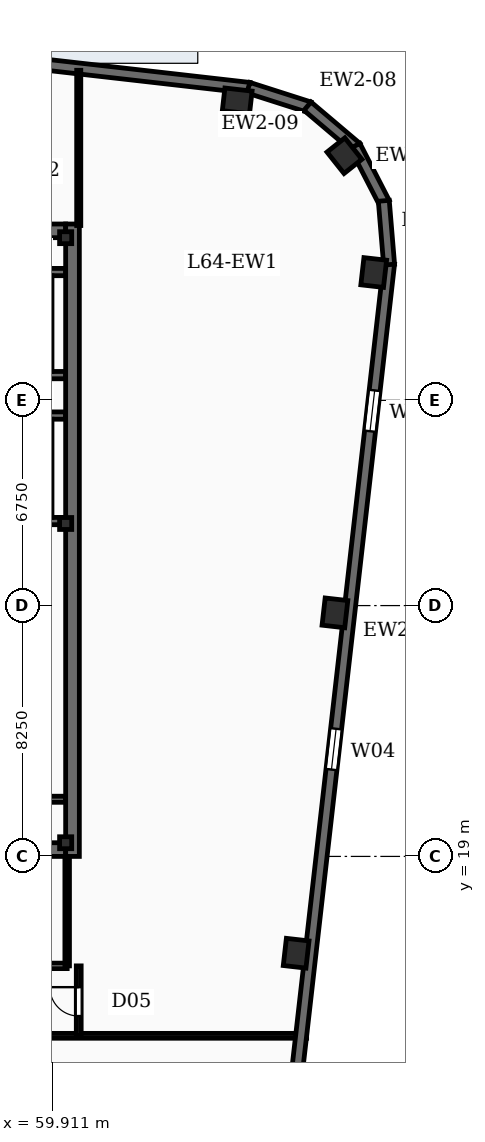
"""IFC4 building model, lengths in metres.
Left out: names, types, materials, properties, quantities, classifications, styles, units other than length and angle.
Written with IfcOpenShell. Run it as: python <this file> out.ifc"""

import sys

from ifc_helpers import new_model, si_unit, direction, frame, frame_2d, origin, origin_2d, place, context, subcontext, project, spatial, rectangle, i_section, extrude, element, fill, save


model = new_model("IFC4")
c1 = context("Model", 3, precision=1e-05, world=origin(), true_north=direction((0.0, 1.0)))
c2 = subcontext(c1, "Body", "Model", "MODEL_VIEW")
j1 = project(units=[si_unit("LENGTHUNIT", "METRE"), si_unit("PLANEANGLEUNIT", "RADIAN")], contexts=[c1])
p1 = place(None, origin())
s1 = spatial("IfcSite", under=j1, at=p1, CompositionType="ELEMENT")
p2 = place(p1, origin())
s2 = spatial("IfcBuilding", under=s1, at=p2, CompositionType="ELEMENT")
p3 = place(p2, frame((0.0, 0.0, 262.2)))
s3 = spatial("IfcBuildingStorey", under=s2, at=p3, CompositionType="ELEMENT", Elevation=262.2)
p4 = place(p3, frame((60.575, 19.0, -0.27), z_axis=(0.0, 0.0, 1.0), x_axis=(0.0, 1.0, 0.0)))
e1 = element("IfcWall", 1, at=p4, inside=s3, PredefinedType="SHEAR", context=c2, shape_type="SweptSolid", body=[
    extrude(rectangle(XDim=20.8, YDim=0.45, at=frame_2d((10.4, 0.0))), origin(), (0.0, 0.0, 1.0), 3.75),
])
for number, where, z_axis, x_axis in (
    (2, (50.55, 19.225, -0.27), (0.0, 0.0, 1.0), (1.0, 0.0, 0.0)),
    (3, (50.55, 39.575, -0.27), (0.0, 0.0, 1.0), (1.0, 0.0, 0.0)),
):
    element("IfcWall", number, at=place(p3, frame(where, z_axis=z_axis, x_axis=x_axis)), inside=s3, PredefinedType="SHEAR", context=c2, shape_type="SweptSolid", body=[
        extrude(rectangle(XDim=9.8, YDim=0.45, at=frame_2d((4.9, 0.0))), origin(), (0.0, 0.0, 1.0), 3.75),
    ])
for number, where, z_axis, x_axis in (
    (4, (60.35, 19.45, -0.27), (0.0, 0.0, 1.0), (1.0, 0.0, 0.0)),
    (5, (60.35, 29.95, -0.27), (0.0, 0.0, 1.0), (1.0, 0.0, 0.0)),
    (6, (60.35, 39.35, -0.27), (0.0, 0.0, 1.0), (1.0, 0.0, 0.0)),
):
    element("IfcColumn", number, at=place(p3, frame(where, z_axis=z_axis, x_axis=x_axis)), inside=s3, PredefinedType="COLUMN", context=c2, shape_type="SweptSolid", body=[
        extrude(i_section(OverallWidth=0.399, OverallDepth=0.393, WebThickness=0.023, FlangeThickness=0.037, FilletRadius=0.02, at=origin_2d()), origin(), (0.0, 0.0, 1.0), 3.75),
    ])
for number, where, z_axis, x_axis in (
    (7, (67.931, 15.816, -0.27), (0.0, 0.0, 1.0), (0.113, 0.994, 0.0)),
    (8, (69.207, 27.01, -0.27), (0.0, 0.0, 1.0), (0.113, 0.994, 0.0)),
    (9, (70.482, 38.205, -0.27), (0.0, 0.0, 1.0), (0.113, 0.994, 0.0)),
    (10, (69.52, 42.047, -0.27), (0.0, 0.0, 1.0), (-0.623, 0.783, 0.0)),
    (11, (65.992, 43.849, -0.27), (0.0, 0.0, 1.0), (0.994, -0.113, 0.0)),
):
    element("IfcColumn", number, at=place(p3, frame(where, z_axis=z_axis, x_axis=x_axis)), inside=s3, PredefinedType="COLUMN", context=c2, shape_type="SweptSolid", body=[
        extrude(rectangle(XDim=0.9, YDim=0.75, at=origin_2d()), origin(), (0.0, 0.0, 1.0), 3.75),
    ])
p5 = place(p3, frame((70.989, 38.499, 0.0), z_axis=(0.0, 0.0, 1.0), x_axis=(-0.113203107947, -0.993571867733, 0.0)))
e12 = element("IfcWall", 12, at=p5, inside=s3, PredefinedType="SOLIDWALL", context=c2, shape_type="SweptSolid", body=[
    extrude(rectangle(XDim=34.5, YDim=0.36, at=frame_2d((17.25, 0.0))), origin(), (0.0, 0.0, 1.0), 3.48),
])
p6 = place(p5, frame((4.2, 0.0, 0.88)))
e13 = element("IfcOpeningElement", 13, at=p6, cuts=e12, PredefinedType="OPENING", context=c2, shape_type="SweptSolid", body=[
    extrude(rectangle(XDim=1.35, YDim=2.2, at=frame_2d((0.675, 1.1))), frame((0.0, 0.19, 0.0), z_axis=(0.0, -1.0, 0.0), x_axis=(1.0, 0.0, 0.0)), (0.0, 0.0, 1.0), 0.38),
])
p7 = place(p5, frame((15.4, 0.0, 0.88)))
e14 = element("IfcOpeningElement", 14, at=p7, cuts=e12, PredefinedType="OPENING", context=c2, shape_type="SweptSolid", body=[
    extrude(rectangle(XDim=1.35, YDim=2.2, at=frame_2d((0.675, 1.1))), frame((0.0, 0.19, 0.0), z_axis=(0.0, -1.0, 0.0), x_axis=(1.0, 0.0, 0.0)), (0.0, 0.0, 1.0), 0.38),
])
p8 = place(p5, frame((26.6, 0.0, 0.88)))
e15 = element("IfcOpeningElement", 15, at=p8, cuts=e12, PredefinedType="OPENING", context=c2, shape_type="SweptSolid", body=[
    extrude(rectangle(XDim=1.35, YDim=2.2, at=frame_2d((0.675, 1.1))), frame((0.0, 0.19, 0.0), z_axis=(0.0, -1.0, 0.0), x_axis=(1.0, 0.0, 0.0)), (0.0, 0.0, 1.0), 0.38),
])
p9 = place(p3, frame((70.814, 40.564, 0.0), z_axis=(0.0, 0.0, 1.0), x_axis=(0.082853678144, -0.996561723135, 0.0)))
e16 = element("IfcWall", 16, at=p9, inside=s3, PredefinedType="SOLIDWALL", context=c2, shape_type="SweptSolid", body=[
    extrude(rectangle(XDim=2.107, YDim=0.36, at=frame_2d((1.053, 0.0))), origin(), (0.0, 0.0, 1.0), 3.48),
])
for number, where, z_axis, x_axis in (
    (17, (69.868, 42.369, 0.0), (0.0, 0.0, 1.0), (0.458, -0.889, 0.0)),
    (18, (68.304, 43.676, 0.0), (0.0, 0.0, 1.0), (0.763, -0.646, 0.0)),
    (19, (66.359, 44.284, 0.0), (0.0, 0.0, 1.0), (0.952, -0.305, 0.0)),
):
    element("IfcWall", number, at=place(p3, frame(where, z_axis=z_axis, x_axis=x_axis)), inside=s3, PredefinedType="SOLIDWALL", context=c2, shape_type="SweptSolid", body=[
        extrude(rectangle(XDim=2.107, YDim=0.36, at=frame_2d((1.054, 0.0))), origin(), (0.0, 0.0, 1.0), 3.48),
    ])
p10 = place(p3, frame((19.894, 49.575, 0.0), z_axis=(0.0, 0.0, 1.0), x_axis=(0.993571439016, -0.113206870688, 0.0)))
e20 = element("IfcWall", 20, at=p10, inside=s3, PredefinedType="SOLIDWALL", context=c2, shape_type="SweptSolid", body=[
    extrude(rectangle(XDim=46.8, YDim=0.36, at=frame_2d((23.4, 0.0))), origin(), (0.0, 0.0, 1.0), 3.48),
])
p11 = place(p10, frame((2.6, 0.0, 0.88)))
e21 = element("IfcOpeningElement", 21, at=p11, cuts=e20, PredefinedType="OPENING", context=c2, shape_type="SweptSolid", body=[
    extrude(rectangle(XDim=1.8, YDim=2.15, at=frame_2d((0.9, 1.075))), frame((0.0, 0.19, 0.0), z_axis=(0.0, -1.0, 0.0), x_axis=(1.0, 0.0, 0.0)), (0.0, 0.0, 1.0), 0.38),
])
p12 = place(p10, frame((8.0, 0.0, 0.88)))
e22 = element("IfcOpeningElement", 22, at=p12, cuts=e20, PredefinedType="OPENING", context=c2, shape_type="SweptSolid", body=[
    extrude(rectangle(XDim=1.8, YDim=2.15, at=frame_2d((0.9, 1.075))), frame((0.0, 0.19, 0.0), z_axis=(0.0, -1.0, 0.0), x_axis=(1.0, 0.0, 0.0)), (0.0, 0.0, 1.0), 0.38),
])
p13 = place(p10, frame((13.4, 0.0, 0.88)))
e23 = element("IfcOpeningElement", 23, at=p13, cuts=e20, PredefinedType="OPENING", context=c2, shape_type="SweptSolid", body=[
    extrude(rectangle(XDim=1.8, YDim=2.15, at=frame_2d((0.9, 1.075))), frame((0.0, 0.19, 0.0), z_axis=(0.0, -1.0, 0.0), x_axis=(1.0, 0.0, 0.0)), (0.0, 0.0, 1.0), 0.38),
])
p14 = place(p10, frame((18.8, 0.0, 0.88)))
e24 = element("IfcOpeningElement", 24, at=p14, cuts=e20, PredefinedType="OPENING", context=c2, shape_type="SweptSolid", body=[
    extrude(rectangle(XDim=1.8, YDim=2.15, at=frame_2d((0.9, 1.075))), frame((0.0, 0.19, 0.0), z_axis=(0.0, -1.0, 0.0), x_axis=(1.0, 0.0, 0.0)), (0.0, 0.0, 1.0), 0.38),
])
p15 = place(p10, frame((29.6, 0.0, 0.88)))
e25 = element("IfcOpeningElement", 25, at=p15, cuts=e20, PredefinedType="OPENING", context=c2, shape_type="SweptSolid", body=[
    extrude(rectangle(XDim=1.8, YDim=2.15, at=frame_2d((0.9, 1.075))), frame((0.0, 0.19, 0.0), z_axis=(0.0, -1.0, 0.0), x_axis=(1.0, 0.0, 0.0)), (0.0, 0.0, 1.0), 0.38),
])
p16 = place(p3, frame((60.35, 30.03, 0.0), z_axis=(0.0, 0.0, 1.0), x_axis=(-1.0, 0.0, 0.0)))
e26 = element("IfcWall", 26, at=p16, inside=s3, PredefinedType="SOLIDWALL", context=c2, shape_type="SweptSolid", body=[
    extrude(rectangle(XDim=9.8, YDim=0.24, at=frame_2d((4.9, 0.0))), origin(), (0.0, 0.0, 1.0), 3.48),
])
p17 = place(p16, frame((7.83, 0.0, 0.0)))
e27 = element("IfcOpeningElement", 27, at=p17, cuts=e26, PredefinedType="OPENING", context=c2, shape_type="SweptSolid", body=[
    extrude(rectangle(XDim=1.1, YDim=2.15, at=frame_2d((0.55, 1.075))), frame((0.0, 0.13, 0.0), z_axis=(0.0, -1.0, 0.0), x_axis=(1.0, 0.0, 0.0)), (0.0, 0.0, 1.0), 0.26),
])
p18 = place(p3, frame((50.55, 33.5, 0.0), z_axis=(0.0, 0.0, 1.0), x_axis=(1.0, 0.0, 0.0)))
e28 = element("IfcWall", 28, at=p18, inside=s3, PredefinedType="SOLIDWALL", context=c2, shape_type="SweptSolid", body=[
    extrude(rectangle(XDim=9.8, YDim=0.24, at=frame_2d((4.9, 0.0))), origin(), (0.0, 0.0, 1.0), 3.48),
])
p19 = place(p3, frame((59.78, 30.15, 0.0), z_axis=(0.0, 0.0, 1.0), x_axis=(0.0, 1.0, 0.0)))
e29 = element("IfcWall", 29, at=p19, inside=s3, PredefinedType="SOLIDWALL", context=c2, shape_type="SweptSolid", body=[
    extrude(rectangle(XDim=3.23, YDim=0.24, at=frame_2d((1.615, 0.0))), origin(), (0.0, 0.0, 1.0), 3.48),
])
p20 = place(p3, frame((60.35, 34.83, 0.0), z_axis=(0.0, 0.0, 1.0), x_axis=(-1.0, 0.0, 0.0)))
e30 = element("IfcWall", 30, at=p20, inside=s3, PredefinedType="SOLIDWALL", context=c2, shape_type="SweptSolid", body=[
    extrude(rectangle(XDim=9.8, YDim=0.24, at=frame_2d((4.9, 0.0))), origin(), (0.0, 0.0, 1.0), 3.48),
])
p21 = place(p20, frame((7.87, 0.0, 0.0)))
e31 = element("IfcOpeningElement", 31, at=p21, cuts=e30, PredefinedType="OPENING", context=c2, shape_type="SweptSolid", body=[
    extrude(rectangle(XDim=1.1, YDim=2.15, at=frame_2d((0.55, 1.075))), frame((0.0, 0.13, 0.0), z_axis=(0.0, -1.0, 0.0), x_axis=(1.0, 0.0, 0.0)), (0.0, 0.0, 1.0), 0.26),
])
p22 = place(p3, frame((50.55, 38.22, 0.0), z_axis=(0.0, 0.0, 1.0), x_axis=(1.0, 0.0, 0.0)))
e32 = element("IfcWall", 32, at=p22, inside=s3, PredefinedType="SOLIDWALL", context=c2, shape_type="SweptSolid", body=[
    extrude(rectangle(XDim=9.8, YDim=0.24, at=frame_2d((4.9, 0.0))), origin(), (0.0, 0.0, 1.0), 3.48),
])
p23 = place(p3, frame((59.78, 34.95, 0.0), z_axis=(0.0, 0.0, 1.0), x_axis=(0.0, 1.0, 0.0)))
e33 = element("IfcWall", 33, at=p23, inside=s3, PredefinedType="SOLIDWALL", context=c2, shape_type="SweptSolid", body=[
    extrude(rectangle(XDim=3.15, YDim=0.24, at=frame_2d((1.575, 0.0))), origin(), (0.0, 0.0, 1.0), 3.48),
])
p24 = place(p3, frame((50.55, 20.88, 0.0), z_axis=(0.0, 0.0, 1.0), x_axis=(1.0, 0.0, 0.0)))
e34 = element("IfcWall", 34, at=p24, inside=s3, PredefinedType="SOLIDWALL", context=c2, shape_type="SweptSolid", body=[
    extrude(rectangle(XDim=9.8, YDim=0.2, at=frame_2d((4.9, 0.0))), origin(), (0.0, 0.0, 1.0), 2.54),
])
p25 = place(p24, frame((1.4, 0.0, 0.0)))
e35 = element("IfcOpeningElement", 35, at=p25, cuts=e34, PredefinedType="OPENING", context=c2, shape_type="SweptSolid", body=[
    extrude(rectangle(XDim=1.05, YDim=2.15, at=frame_2d((0.525, 1.075))), frame((0.0, 0.11, 0.0), z_axis=(0.0, -1.0, 0.0), x_axis=(1.0, 0.0, 0.0)), (0.0, 0.0, 1.0), 0.22),
])
p26 = place(p24, frame((5.5, 0.0, 0.0)))
e36 = element("IfcOpeningElement", 36, at=p26, cuts=e34, PredefinedType="OPENING", context=c2, shape_type="SweptSolid", body=[
    extrude(rectangle(XDim=1.05, YDim=2.15, at=frame_2d((0.525, 1.075))), frame((0.0, 0.11, 0.0), z_axis=(0.0, -1.0, 0.0), x_axis=(1.0, 0.0, 0.0)), (0.0, 0.0, 1.0), 0.22),
])
p27 = place(p3, frame((50.4, 15.4, 0.0), z_axis=(0.0, 0.0, 1.0), x_axis=(1.0, 0.0, 0.0)))
e37 = element("IfcWall", 37, at=p27, inside=s3, PredefinedType="SOLIDWALL", context=c2, shape_type="SweptSolid", body=[
    extrude(rectangle(XDim=10.0, YDim=0.18, at=frame_2d((5.0, 0.0))), origin(), (0.0, 0.0, 1.0), 2.54),
])
p28 = place(p27, frame((1.94, 0.0, 0.0)))
e38 = element("IfcOpeningElement", 38, at=p28, cuts=e37, PredefinedType="OPENING", context=c2, shape_type="SweptSolid", body=[
    extrude(rectangle(XDim=0.92, YDim=2.1, at=frame_2d((0.46, 1.05))), frame((0.0, 0.1, 0.0), z_axis=(0.0, -1.0, 0.0), x_axis=(1.0, 0.0, 0.0)), (0.0, 0.0, 1.0), 0.2),
])
p29 = place(p27, frame((6.97, 0.0, 0.0)))
e39 = element("IfcOpeningElement", 39, at=p29, cuts=e37, PredefinedType="OPENING", context=c2, shape_type="SweptSolid", body=[
    extrude(rectangle(XDim=0.86, YDim=2.05, at=frame_2d((0.43, 1.025))), frame((0.0, 0.1, 0.0), z_axis=(0.0, -1.0, 0.0), x_axis=(1.0, 0.0, 0.0)), (0.0, 0.0, 1.0), 0.2),
])
p30 = place(p3, frame((60.4, 15.4, 0.0), z_axis=(0.0, 0.0, 1.0), x_axis=(0.0, 1.0, 0.0)))
e40 = element("IfcWall", 40, at=p30, inside=s3, PredefinedType="PARTITIONING", context=c2, shape_type="SweptSolid", body=[
    extrude(rectangle(XDim=3.58, YDim=0.15, at=frame_2d((1.79, 0.0))), origin(), (0.0, 0.0, 1.0), 2.54),
])
p31 = place(p3, frame((10.303, 13.1, 0.0), z_axis=(0.0, 0.0, 1.0), x_axis=(1.0, 0.0, 0.0)))
e41 = element("IfcWall", 41, at=p31, inside=s3, PredefinedType="PARTITIONING", context=c2, shape_type="SweptSolid", body=[
    extrude(rectangle(XDim=57.973, YDim=0.16, at=frame_2d((28.986, 0.0))), origin(), (0.0, 0.0, 1.0), 2.54),
])
p32 = place(p31, frame((11.722, 0.0, 0.0)))
e42 = element("IfcOpeningElement", 42, at=p32, cuts=e41, PredefinedType="OPENING", context=c2, shape_type="SweptSolid", body=[
    extrude(rectangle(XDim=0.95, YDim=2.15, at=frame_2d((0.475, 1.075))), frame((0.0, 0.09, 0.0), z_axis=(0.0, -1.0, 0.0), x_axis=(1.0, 0.0, 0.0)), (0.0, 0.0, 1.0), 0.18),
])
p33 = place(p31, frame((28.222, 0.0, 0.0)))
e43 = element("IfcOpeningElement", 43, at=p33, cuts=e41, PredefinedType="OPENING", context=c2, shape_type="SweptSolid", body=[
    extrude(rectangle(XDim=0.95, YDim=2.15, at=frame_2d((0.475, 1.075))), frame((0.0, 0.09, 0.0), z_axis=(0.0, -1.0, 0.0), x_axis=(1.0, 0.0, 0.0)), (0.0, 0.0, 1.0), 0.18),
])
p34 = place(p31, frame((37.922, 0.0, 0.0)))
e44 = element("IfcOpeningElement", 44, at=p34, cuts=e41, PredefinedType="OPENING", context=c2, shape_type="SweptSolid", body=[
    extrude(rectangle(XDim=0.95, YDim=2.15, at=frame_2d((0.475, 1.075))), frame((0.0, 0.09, 0.0), z_axis=(0.0, -1.0, 0.0), x_axis=(1.0, 0.0, 0.0)), (0.0, 0.0, 1.0), 0.18),
])
p35 = place(p3, frame((60.78, 39.75, 0.0), z_axis=(0.0, 0.0, 1.0), x_axis=(0.0, 1.0, 0.0)))
e45 = element("IfcWall", 45, at=p35, inside=s3, PredefinedType="PARTITIONING", context=c2, shape_type="SweptSolid", body=[
    extrude(rectangle(XDim=5.106, YDim=0.135, at=frame_2d((2.553, 0.0))), origin(), (0.0, 0.0, 1.0), 2.54),
])
p36 = place(p3, frame((60.78, 13.1, 0.0), z_axis=(0.0, 0.0, 1.0), x_axis=(0.0, 1.0, 0.0)))
e46 = element("IfcWall", 46, at=p36, inside=s3, PredefinedType="PARTITIONING", context=c2, shape_type="SweptSolid", body=[
    extrude(rectangle(XDim=2.3, YDim=0.16, at=frame_2d((1.15, 0.0))), origin(), (0.0, 0.0, 1.0), 2.54),
])
p37 = place(p36, frame((0.65, 0.0, 0.0)))
e47 = element("IfcOpeningElement", 47, at=p37, cuts=e46, PredefinedType="OPENING", context=c2, shape_type="SweptSolid", body=[
    extrude(rectangle(XDim=0.95, YDim=2.15, at=frame_2d((0.475, 1.075))), frame((0.0, 0.09, 0.0), z_axis=(0.0, -1.0, 0.0), x_axis=(1.0, 0.0, 0.0)), (0.0, 0.0, 1.0), 0.18),
])
p38 = place(p6, origin())
e48 = element("IfcWindow", 48, at=p38, inside=s3, PartitioningType="SINGLE_PANEL", PredefinedType="WINDOW", context=c2, shape_type="SweptSolid", body=[
    extrude(rectangle(XDim=1.35, YDim=2.2, at=frame_2d((0.675, 1.1))), frame((0.0, 0.03, 0.0), z_axis=(0.0, -1.0, 0.0), x_axis=(1.0, 0.0, 0.0)), (0.0, 0.0, 1.0), 0.06),
])
fill(e13, e48)
p39 = place(p7, origin())
e49 = element("IfcWindow", 49, at=p39, inside=s3, PartitioningType="SINGLE_PANEL", PredefinedType="WINDOW", context=c2, shape_type="SweptSolid", body=[
    extrude(rectangle(XDim=1.35, YDim=2.2, at=frame_2d((0.675, 1.1))), frame((0.0, 0.03, 0.0), z_axis=(0.0, -1.0, 0.0), x_axis=(1.0, 0.0, 0.0)), (0.0, 0.0, 1.0), 0.06),
])
fill(e14, e49)
p40 = place(p37, origin())
e50 = element("IfcDoor", 50, at=p40, inside=s3, OperationType="SINGLE_SWING_RIGHT", PredefinedType="DOOR", context=c2, shape_type="SweptSolid", body=[
    extrude(rectangle(XDim=0.95, YDim=2.15, at=frame_2d((0.475, 1.075))), frame((0.0, 0.025, 0.0), z_axis=(0.0, -1.0, 0.0), x_axis=(1.0, 0.0, 0.0)), (0.0, 0.0, 1.0), 0.05),
])
fill(e47, e50)
save(model, sys.argv[1])
